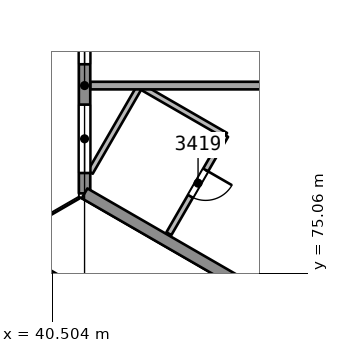
"""IFC4 building model, lengths in metres.
Left out: names, types, materials, properties, quantities, classifications, styles, units other than length and angle.
Written with IfcOpenShell. Run it as: python <this file> out.ifc"""

import sys

from ifc_helpers import new_model, si_unit, direction, frame, frame_2d, origin, place, context, subcontext, project, spatial, rectangle, extrude, element, fill, save


model = new_model("IFC4")
c1 = context("Model", 3, precision=1e-05, world=origin(), true_north=direction((0.0, 1.0)))
c2 = subcontext(c1, "Body", "Model", "MODEL_VIEW")
j1 = project(units=[si_unit("LENGTHUNIT", "METRE"), si_unit("PLANEANGLEUNIT", "RADIAN")], contexts=[c1])
p1 = place(None, origin())
s1 = spatial("IfcSite", under=j1, at=p1, CompositionType="ELEMENT")
p2 = place(p1, origin())
s2 = spatial("IfcBuilding", under=s1, at=p2, CompositionType="ELEMENT")
p3 = place(p2, frame((0.0, 0.0, 140.1)))
s3 = spatial("IfcBuildingStorey", under=s2, at=p3, CompositionType="ELEMENT", Elevation=140.1)
p4 = place(p3, frame((41.507, 80.0, 0.0), z_axis=(0.0, 0.0, 1.0), x_axis=(1.0, 0.0, 0.0)))
e1 = element("IfcWall", 1, at=p4, inside=s3, PredefinedType="PARTITIONING", context=c2, shape_type="SweptSolid", body=[
    extrude(rectangle(XDim=6.691, YDim=0.2, at=frame_2d((3.346, 0.0))), origin(), (0.0, 0.0, 1.0), 3.25),
])
p5 = place(p3, frame((41.507, 77.718, 0.0), z_axis=(0.0, 0.0, 1.0), x_axis=(0.499975031064, 0.866039819127, 0.0)))
e2 = element("IfcWall", 2, at=p5, inside=s3, PredefinedType="PARTITIONING", context=c2, shape_type="SweptSolid", body=[
    extrude(rectangle(XDim=2.622, YDim=0.15, at=frame_2d((1.311, 0.0))), origin(), (0.0, 0.0, 1.0), 3.25),
])
p6 = place(p3, frame((42.817, 79.988, 0.0), z_axis=(0.0, 0.0, 1.0), x_axis=(0.866021400173, -0.500006934395, 0.0)))
e3 = element("IfcWall", 3, at=p6, inside=s3, PredefinedType="PARTITIONING", context=c2, shape_type="SweptSolid", body=[
    extrude(rectangle(XDim=2.6, YDim=0.15, at=frame_2d((1.3, 0.0))), origin(), (0.0, 0.0, 1.0), 3.25),
])
p7 = place(p3, frame((45.069, 78.688, 0.0), z_axis=(0.0, 0.0, 1.0), x_axis=(-0.500017373705, -0.866015372839, 0.0)))
e4 = element("IfcWall", 4, at=p7, inside=s3, PredefinedType="PARTITIONING", context=c2, shape_type="SweptSolid", body=[
    extrude(rectangle(XDim=2.986, YDim=0.15, at=frame_2d((1.493, 0.0))), origin(), (0.0, 0.0, 1.0), 3.25),
])
p8 = place(p7, frame((1.05, 0.0, 0.0)))
e5 = element("IfcOpeningElement", 5, at=p8, cuts=e4, PredefinedType="OPENING", context=c2, shape_type="SweptSolid", body=[
    extrude(rectangle(XDim=0.8, YDim=2.1, at=frame_2d((0.4, 1.05))), frame((0.0, 0.085, 0.0), z_axis=(0.0, -1.0, 0.0), x_axis=(1.0, 0.0, 0.0)), (0.0, 0.0, 1.0), 0.171),
])
p9 = place(p3, frame((41.358, 77.164, 0.0), z_axis=(0.0, 0.0, 1.0), x_axis=(0.0, 1.0, 0.0)))
e6 = element("IfcWall", 6, at=p9, inside=s3, PredefinedType="SOLIDWALL", context=c2, shape_type="SweptSolid", body=[
    extrude(rectangle(XDim=5.672, YDim=0.3, at=frame_2d((2.836, 0.0))), origin(), (0.0, 0.0, 1.0), 3.25),
])
p10 = place(p9, frame((0.535, 0.0, 0.9)))
e7 = element("IfcOpeningElement", 7, at=p10, cuts=e6, PredefinedType="OPENING", context=c2, shape_type="SweptSolid", body=[
    extrude(rectangle(XDim=1.8, YDim=1.5, at=frame_2d((0.9, 0.75))), frame((0.0, 0.161, 0.0), z_axis=(0.0, -1.0, 0.0), x_axis=(1.0, 0.0, 0.0)), (0.0, 0.0, 1.0), 0.321),
])
p11 = place(p9, frame((3.397, 0.0, 0.9)))
e8 = element("IfcOpeningElement", 8, at=p11, cuts=e6, PredefinedType="OPENING", context=c2, shape_type="SweptSolid", body=[
    extrude(rectangle(XDim=1.8, YDim=1.5, at=frame_2d((0.9, 0.75))), frame((0.0, 0.161, 0.0), z_axis=(0.0, -1.0, 0.0), x_axis=(1.0, 0.0, 0.0)), (0.0, 0.0, 1.0), 0.321),
])
p12 = place(p3, frame((89.365, 49.447, 0.0), z_axis=(0.0, 0.0, 1.0), x_axis=(-0.866024602029, 0.500001388679, 0.0)))
e9 = element("IfcWall", 9, at=p12, inside=s3, PredefinedType="SOLIDWALL", context=c2, shape_type="SweptSolid", body=[
    extrude(rectangle(XDim=55.434, YDim=0.3, at=frame_2d((27.717, 0.0))), origin(), (0.0, 0.0, 1.0), 3.25),
])
p13 = place(p12, frame((31.194, 0.0, 0.0)))
e10 = element("IfcOpeningElement", 10, at=p13, cuts=e9, PredefinedType="OPENING", context=c2, shape_type="SweptSolid", body=[
    extrude(rectangle(XDim=2.4, YDim=2.4, at=frame_2d((1.2, 1.2))), frame((0.0, 0.161, 0.0), z_axis=(0.0, -1.0, 0.0), x_axis=(1.0, 0.0, 0.0)), (0.0, 0.0, 1.0), 0.321),
])
p14 = place(p12, frame((43.056, 0.0, 0.0)))
e11 = element("IfcOpeningElement", 11, at=p14, cuts=e9, PredefinedType="OPENING", context=c2, shape_type="SweptSolid", body=[
    extrude(rectangle(XDim=2.4, YDim=2.4, at=frame_2d((1.2, 1.2))), frame((0.0, 0.161, 0.0), z_axis=(0.0, -1.0, 0.0), x_axis=(1.0, 0.0, 0.0)), (0.0, 0.0, 1.0), 0.321),
])
p15 = place(p12, frame((21.529, 0.0, 0.0)))
e12 = element("IfcOpeningElement", 12, at=p15, cuts=e9, PredefinedType="OPENING", context=c2, shape_type="SweptSolid", body=[
    extrude(rectangle(XDim=2.4, YDim=2.4, at=frame_2d((1.2, 1.2))), frame((0.0, 0.161, 0.0), z_axis=(0.0, -1.0, 0.0), x_axis=(1.0, 0.0, 0.0)), (0.0, 0.0, 1.0), 0.321),
])
p16 = place(p12, frame((10.014, 0.0, 0.0)))
e13 = element("IfcOpeningElement", 13, at=p16, cuts=e9, PredefinedType="OPENING", context=c2, shape_type="SweptSolid", body=[
    extrude(rectangle(XDim=2.4, YDim=2.4, at=frame_2d((1.2, 1.2))), frame((0.0, 0.161, 0.0), z_axis=(0.0, -1.0, 0.0), x_axis=(1.0, 0.0, 0.0)), (0.0, 0.0, 1.0), 0.321),
])
p17 = place(p12, frame((26.205, 0.0, 0.0)))
e14 = element("IfcOpeningElement", 14, at=p17, cuts=e9, PredefinedType="OPENING", context=c2, shape_type="SweptSolid", body=[
    extrude(rectangle(XDim=2.4, YDim=2.4, at=frame_2d((1.2, 1.2))), frame((0.0, 0.161, 0.0), z_axis=(0.0, -1.0, 0.0), x_axis=(1.0, 0.0, 0.0)), (0.0, 0.0, 1.0), 0.321),
])
p18 = place(p8, origin())
e15 = element("IfcDoor", 15, at=p18, inside=s3, OperationType="SINGLE_SWING_LEFT", PredefinedType="NOTDEFINED", context=c2, shape_type="SweptSolid", body=[
    extrude(rectangle(XDim=0.8, YDim=2.1, at=frame_2d((0.4, 1.05))), frame((0.0, 0.025, 0.0), z_axis=(0.0, -1.0, 0.0), x_axis=(1.0, 0.0, 0.0)), (0.0, 0.0, 1.0), 0.05),
])
fill(e5, e15)
p19 = place(p10, origin())
e16 = element("IfcWindow", 16, at=p19, inside=s3, PartitioningType="SINGLE_PANEL", PredefinedType="WINDOW", context=c2, shape_type="SweptSolid", body=[
    extrude(rectangle(XDim=1.8, YDim=1.5, at=frame_2d((0.9, 0.75))), frame((0.0, 0.03, 0.0), z_axis=(0.0, -1.0, 0.0), x_axis=(1.0, 0.0, 0.0)), (0.0, 0.0, 1.0), 0.06),
])
fill(e7, e16)
p20 = place(p11, origin())
e17 = element("IfcWindow", 17, at=p20, inside=s3, PartitioningType="SINGLE_PANEL", PredefinedType="WINDOW", context=c2, shape_type="SweptSolid", body=[
    extrude(rectangle(XDim=1.8, YDim=1.5, at=frame_2d((0.9, 0.75))), frame((0.0, 0.03, 0.0), z_axis=(0.0, -1.0, 0.0), x_axis=(1.0, 0.0, 0.0)), (0.0, 0.0, 1.0), 0.06),
])
fill(e8, e17)
save(model, sys.argv[1])
